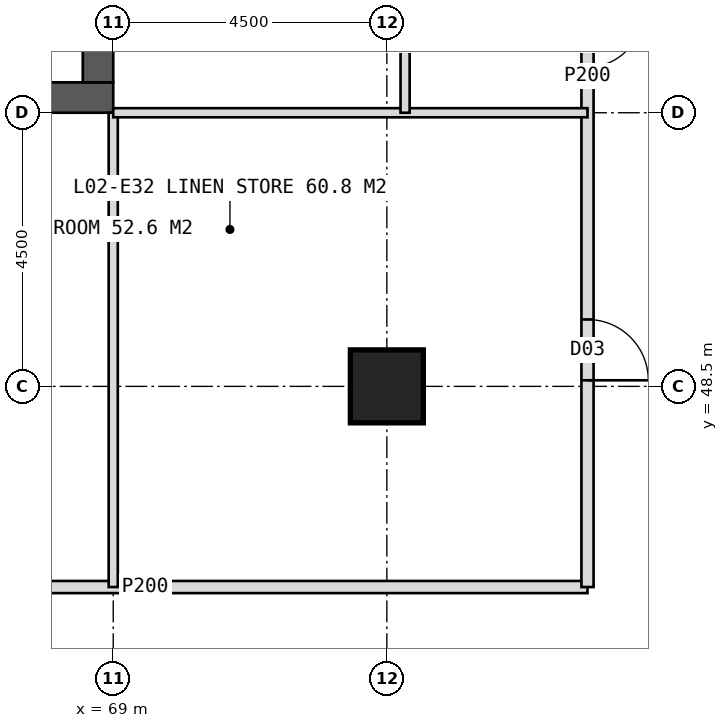
"""IFC4 building model, lengths in metres.
Left out: names, types, materials, properties, quantities, classifications, styles, units other than length and angle.
Written with IfcOpenShell. Run it as: python <this file> out.ifc"""

import sys

from ifc_helpers import new_model, si_unit, direction, frame, frame_2d, origin, origin_2d, place, context, subcontext, project, spatial, rectangle, hollow_rectangle, extrude, element, fill, save


model = new_model("IFC4")
c1 = context("Model", 3, precision=1e-05, world=origin(), true_north=direction((0.0, 1.0)))
c2 = subcontext(c1, "Body", "Model", "MODEL_VIEW")
j1 = project(units=[si_unit("LENGTHUNIT", "METRE"), si_unit("PLANEANGLEUNIT", "RADIAN")], contexts=[c1])
p1 = place(None, origin())
s1 = spatial("IfcSite", under=j1, at=p1, CompositionType="ELEMENT")
p2 = place(p1, origin())
s2 = spatial("IfcBuilding", under=s1, at=p2, CompositionType="ELEMENT")
p3 = place(p2, frame((0.0, 0.0, 11.0)))
s3 = spatial("IfcBuildingStorey", under=s2, at=p3, CompositionType="ELEMENT", Elevation=11.0)
p4 = place(p3, frame((51.0, 53.25, 0.0), z_axis=(0.0, 0.0, 1.0), x_axis=(1.0, 0.0, 0.0)))
e1 = element("IfcWall", 1, at=p4, inside=s3, PredefinedType="SHEAR", context=c2, shape_type="SweptSolid", body=[
    extrude(rectangle(XDim=18.0, YDim=0.5, at=frame_2d((9.0, 0.0))), origin(), (0.0, 0.0, 1.0), 5.5),
])
p5 = place(p4, frame((8.1, 0.0, 0.0)))
e2 = element("IfcOpeningElement", 2, at=p5, cuts=e1, PredefinedType="OPENING", context=c2, shape_type="SweptSolid", body=[
    extrude(rectangle(XDim=1.8, YDim=2.2, at=frame_2d((0.9, 1.1))), frame((0.0, 0.26, 0.0), z_axis=(0.0, -1.0, 0.0), x_axis=(1.0, 0.0, 0.0)), (0.0, 0.0, 1.0), 0.52),
])
p6 = place(p3, frame((68.75, 53.5, 0.0), z_axis=(0.0, 0.0, 1.0), x_axis=(0.0, 1.0, 0.0)))
e3 = element("IfcWall", 3, at=p6, inside=s3, PredefinedType="SHEAR", context=c2, shape_type="SweptSolid", body=[
    extrude(rectangle(XDim=17.0, YDim=0.5, at=frame_2d((8.5, 0.0))), origin(), (0.0, 0.0, 1.0), 5.5),
])
p7 = place(p6, frame((9.5, 0.0, 0.0)))
e4 = element("IfcOpeningElement", 4, at=p7, cuts=e3, PredefinedType="OPENING", context=c2, shape_type="SweptSolid", body=[
    extrude(rectangle(XDim=1.5, YDim=2.2, at=frame_2d((0.75, 1.1))), frame((0.0, 0.26, 0.0), z_axis=(0.0, -1.0, 0.0), x_axis=(1.0, 0.0, 0.0)), (0.0, 0.0, 1.0), 0.52),
])
p8 = place(p3, frame((73.5, 48.5, 0.0), z_axis=(0.0, 0.0, 1.0), x_axis=(1.0, 0.0, 0.0)))
e5 = element("IfcColumn", 5, at=p8, inside=s3, PredefinedType="COLUMN", context=c2, shape_type="SweptSolid", body=[
    extrude(hollow_rectangle(XDim=1.2, YDim=1.2, WallThickness=0.1, at=origin_2d()), origin(), (0.0, 0.0, 1.0), 5.5),
])
p9 = place(p3, frame((76.8, 45.2, 0.0), z_axis=(0.0, 0.0, 1.0), x_axis=(-1.0, 0.0, 0.0)))
e6 = element("IfcWall", 6, at=p9, inside=s3, PredefinedType="PARTITIONING", context=c2, shape_type="SweptSolid", body=[
    extrude(rectangle(XDim=14.55, YDim=0.2, at=frame_2d((7.275, 0.0))), origin(), (0.0, 0.0, 1.0), 5.2),
])
p10 = place(p9, frame((10.675, 0.0, 0.0)))
e7 = element("IfcOpeningElement", 7, at=p10, cuts=e6, PredefinedType="OPENING", context=c2, shape_type="SweptSolid", body=[
    extrude(rectangle(XDim=1.0, YDim=2.1, at=frame_2d((0.5, 1.05))), frame((0.0, 0.11, 0.0), z_axis=(0.0, -1.0, 0.0), x_axis=(1.0, 0.0, 0.0)), (0.0, 0.0, 1.0), 0.22),
])
p11 = place(p3, frame((69.0, 53.0, 0.0), z_axis=(0.0, 0.0, 1.0), x_axis=(0.0, -1.0, 0.0)))
e8 = element("IfcWall", 8, at=p11, inside=s3, PredefinedType="PARTITIONING", context=c2, shape_type="SweptSolid", body=[
    extrude(rectangle(XDim=7.8, YDim=0.15, at=frame_2d((3.9, 0.0))), origin(), (0.0, 0.0, 1.0), 5.2),
])
p12 = place(p3, frame((76.8, 62.0, 0.0), z_axis=(0.0, 0.0, 1.0), x_axis=(0.0, -1.0, 0.0)))
e9 = element("IfcWall", 9, at=p12, inside=s3, PredefinedType="PARTITIONING", context=c2, shape_type="SweptSolid", body=[
    extrude(rectangle(XDim=16.8, YDim=0.2, at=frame_2d((8.4, 0.0))), origin(), (0.0, 0.0, 1.0), 5.2),
])
p13 = place(p12, frame((12.4, 0.0, 0.0)))
e10 = element("IfcOpeningElement", 10, at=p13, cuts=e9, PredefinedType="OPENING", context=c2, shape_type="SweptSolid", body=[
    extrude(rectangle(XDim=1.0, YDim=2.1, at=frame_2d((0.5, 1.05))), frame((0.0, 0.11, 0.0), z_axis=(0.0, -1.0, 0.0), x_axis=(1.0, 0.0, 0.0)), (0.0, 0.0, 1.0), 0.22),
])
p14 = place(p12, frame((7.35, 0.0, 0.0)))
e11 = element("IfcOpeningElement", 11, at=p14, cuts=e9, PredefinedType="OPENING", context=c2, shape_type="SweptSolid", body=[
    extrude(rectangle(XDim=0.9, YDim=2.1, at=frame_2d((0.45, 1.05))), frame((0.0, 0.11, 0.0), z_axis=(0.0, -1.0, 0.0), x_axis=(1.0, 0.0, 0.0)), (0.0, 0.0, 1.0), 0.22),
])
p15 = place(p12, frame((2.8, 0.0, 0.0)))
e12 = element("IfcOpeningElement", 12, at=p15, cuts=e9, PredefinedType="OPENING", context=c2, shape_type="SweptSolid", body=[
    extrude(rectangle(XDim=1.0, YDim=2.1, at=frame_2d((0.5, 1.05))), frame((0.0, 0.11, 0.0), z_axis=(0.0, -1.0, 0.0), x_axis=(1.0, 0.0, 0.0)), (0.0, 0.0, 1.0), 0.22),
])
p16 = place(p3, frame((69.0, 53.0, 0.0), z_axis=(0.0, 0.0, 1.0), x_axis=(1.0, 0.0, 0.0)))
e13 = element("IfcWall", 13, at=p16, inside=s3, PredefinedType="PARTITIONING", context=c2, shape_type="SweptSolid", body=[
    extrude(rectangle(XDim=7.8, YDim=0.15, at=frame_2d((3.9, 0.0))), origin(), (0.0, 0.0, 1.0), 5.2),
])
p17 = place(p3, frame((73.8, 55.4, 0.0), z_axis=(0.0, 0.0, 1.0), x_axis=(0.0, -1.0, 0.0)))
e14 = element("IfcWall", 14, at=p17, inside=s3, PredefinedType="PARTITIONING", context=c2, shape_type="SweptSolid", body=[
    extrude(rectangle(XDim=2.4, YDim=0.15, at=frame_2d((1.2, 0.0))), origin(), (0.0, 0.0, 1.0), 5.2),
])
p18 = place(p13, origin())
e15 = element("IfcDoor", 15, at=p18, inside=s3, OperationType="SINGLE_SWING_RIGHT", PredefinedType="DOOR", context=c2, shape_type="SweptSolid", body=[
    extrude(rectangle(XDim=1.0, YDim=2.1, at=frame_2d((0.5, 1.05))), frame((0.0, 0.025, 0.0), z_axis=(0.0, -1.0, 0.0), x_axis=(1.0, 0.0, 0.0)), (0.0, 0.0, 1.0), 0.05),
])
fill(e10, e15)
p19 = place(p14, origin())
e16 = element("IfcDoor", 16, at=p19, inside=s3, OperationType="SINGLE_SWING_LEFT", PredefinedType="DOOR", context=c2, shape_type="SweptSolid", body=[
    extrude(rectangle(XDim=0.9, YDim=2.1, at=frame_2d((0.45, 1.05))), frame((0.0, 0.025, 0.0), z_axis=(0.0, -1.0, 0.0), x_axis=(1.0, 0.0, 0.0)), (0.0, 0.0, 1.0), 0.05),
])
fill(e11, e16)
save(model, sys.argv[1])
